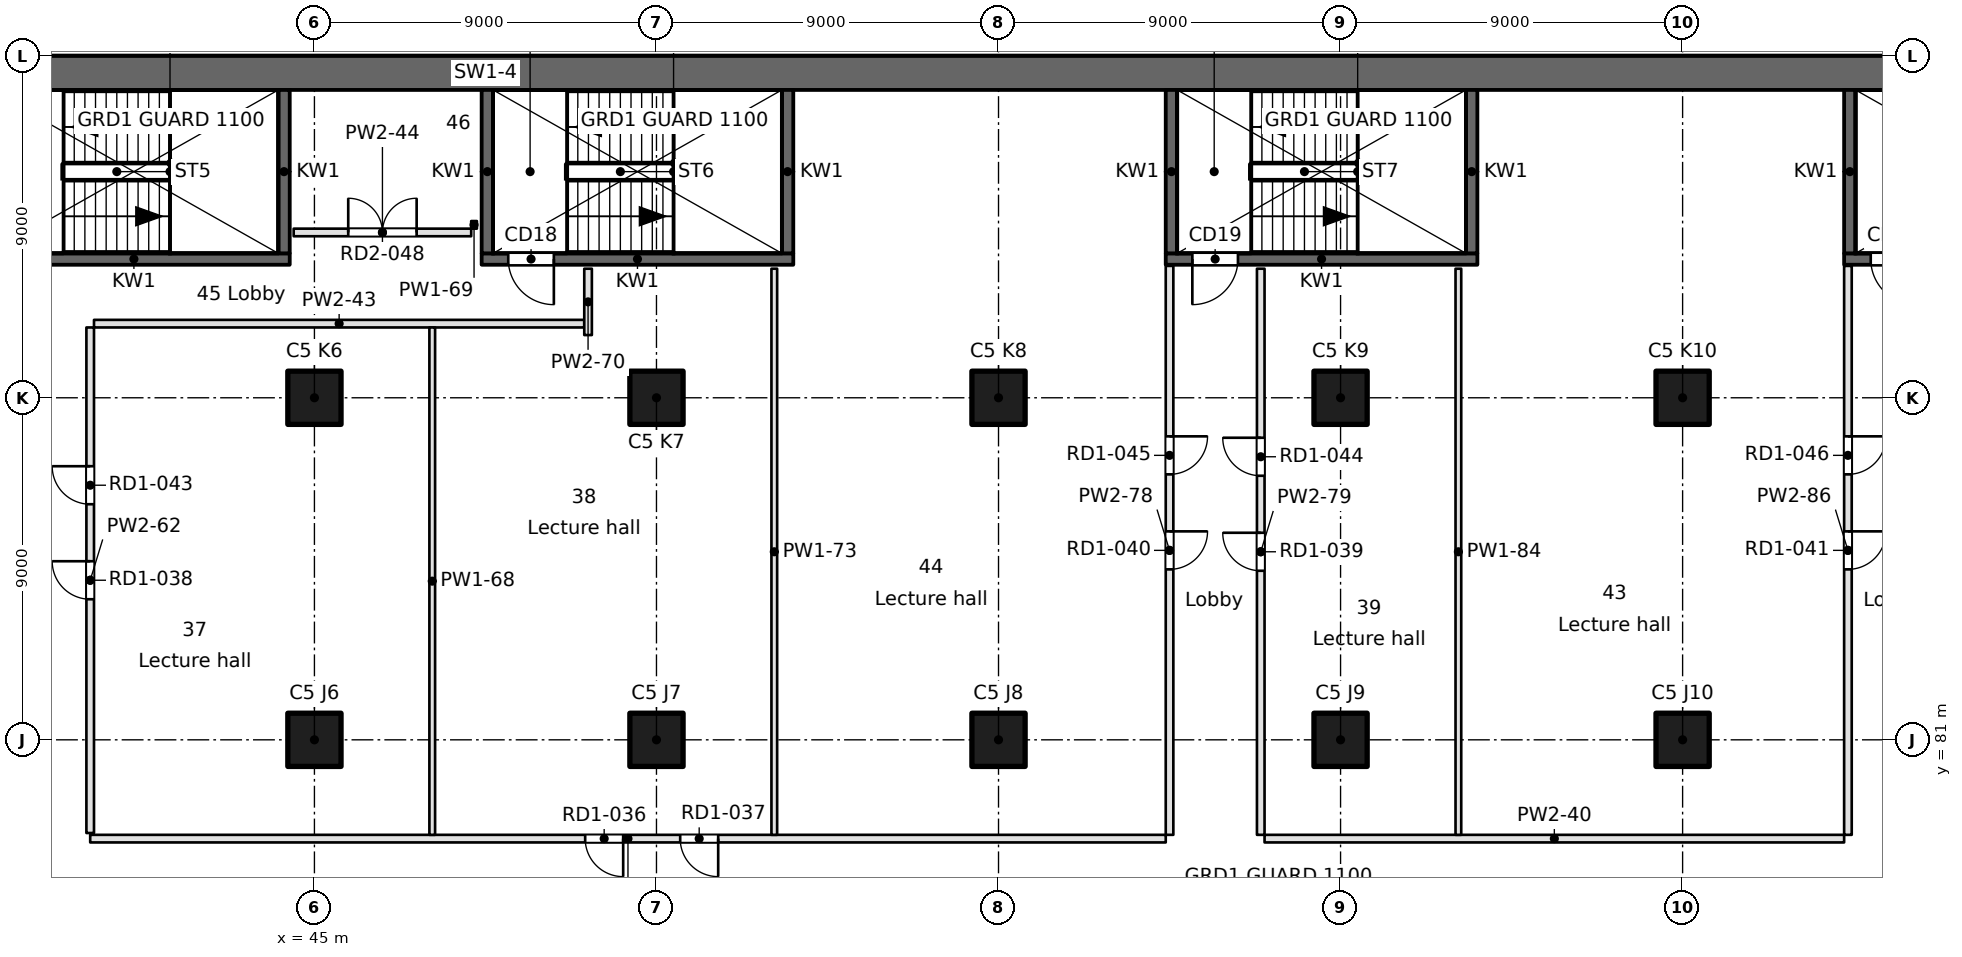
"""IFC4 building model, lengths in metres.
Left out: names, types, materials, properties, quantities, classifications, styles, units other than length and angle.
Written with IfcOpenShell. Run it as: python <this file> out.ifc"""

import sys

from ifc_helpers import new_model, si_unit, direction, frame, frame_2d, origin, origin_2d, place, context, subcontext, project, spatial, rectangle, extrude, element, fill, save


model = new_model("IFC4")
c1 = context("Model", 3, precision=1e-05, world=origin(), true_north=direction((0.0, 1.0)))
c2 = subcontext(c1, "Body", "Model", "MODEL_VIEW")
j1 = project(units=[si_unit("LENGTHUNIT", "METRE"), si_unit("PLANEANGLEUNIT", "RADIAN")], contexts=[c1])
p1 = place(None, origin())
s1 = spatial("IfcSite", under=j1, at=p1, CompositionType="ELEMENT")
p2 = place(p1, origin())
s2 = spatial("IfcBuilding", under=s1, at=p2, CompositionType="ELEMENT")
p3 = place(p2, frame((0.0, 0.0, 76.5)))
s3 = spatial("IfcBuildingStorey", under=s2, at=p3, CompositionType="ELEMENT", Elevation=76.5)
for number, where, z_axis, x_axis in (
    (1, (45.0, 81.0, 0.0), (0.0, 0.0, 1.0), (1.0, 0.0, 0.0)),
    (2, (45.0, 90.0, 0.0), (0.0, 0.0, 1.0), (1.0, 0.0, 0.0)),
    (3, (54.0, 81.0, 0.0), (0.0, 0.0, 1.0), (1.0, 0.0, 0.0)),
    (4, (54.0, 90.0, 0.0), (0.0, 0.0, 1.0), (1.0, 0.0, 0.0)),
    (5, (63.0, 81.0, 0.0), (0.0, 0.0, 1.0), (1.0, 0.0, 0.0)),
    (6, (63.0, 90.0, 0.0), (0.0, 0.0, 1.0), (1.0, 0.0, 0.0)),
    (7, (72.0, 81.0, 0.0), (0.0, 0.0, 1.0), (1.0, 0.0, 0.0)),
    (8, (72.0, 90.0, 0.0), (0.0, 0.0, 1.0), (1.0, 0.0, 0.0)),
    (9, (81.0, 81.0, 0.0), (0.0, 0.0, 1.0), (1.0, 0.0, 0.0)),
    (10, (81.0, 90.0, 0.0), (0.0, 0.0, 1.0), (1.0, 0.0, 0.0)),
):
    element("IfcColumn", number, at=place(p3, frame(where, z_axis=z_axis, x_axis=x_axis)), inside=s3, PredefinedType="COLUMN", context=c2, shape_type="SweptSolid", body=[
        extrude(rectangle(XDim=1.4, YDim=1.4, at=origin_2d()), origin(), (0.0, 0.0, 1.0), 3.7),
    ])
p4 = place(p3, frame((94.5, 98.55, 0.0), z_axis=(0.0, 0.0, 1.0), x_axis=(-1.0, 0.0, 0.0)))
e11 = element("IfcWall", 11, at=p4, inside=s3, PredefinedType="SHEAR", context=c2, shape_type="SweptSolid", body=[
    extrude(rectangle(XDim=90.0, YDim=0.9, at=frame_2d((45.0, 0.0))), origin(), (0.0, 0.0, 1.0), 3.25),
])
p5 = place(p3, frame((36.15, 93.65, -0.4), z_axis=(0.0, 0.0, 1.0), x_axis=(1.0, 0.0, 0.0)))
e12 = element("IfcWall", 12, at=p5, inside=s3, PredefinedType="SOLIDWALL", context=c2, shape_type="SweptSolid", body=[
    extrude(rectangle(XDim=8.2, YDim=0.3, at=frame_2d((4.1, 0.0))), origin(), (0.0, 0.0, 1.0), 3.65),
])
p6 = place(p5, frame((0.7, 0.0, 0.4)))
e13 = element("IfcOpeningElement", 13, at=p6, cuts=e12, PredefinedType="OPENING", context=c2, shape_type="SweptSolid", body=[
    extrude(rectangle(XDim=1.2, YDim=2.1, at=frame_2d((0.6, 1.05))), frame((0.0, 0.15, 0.0), z_axis=(0.0, -1.0, 0.0), x_axis=(1.0, 0.0, 0.0)), (0.0, 0.0, 1.0), 0.3),
])
p7 = place(p3, frame((49.4, 93.65, -0.4), z_axis=(0.0, 0.0, 1.0), x_axis=(1.0, 0.0, 0.0)))
e14 = element("IfcWall", 14, at=p7, inside=s3, PredefinedType="SOLIDWALL", context=c2, shape_type="SweptSolid", body=[
    extrude(rectangle(XDim=8.2, YDim=0.3, at=frame_2d((4.1, 0.0))), origin(), (0.0, 0.0, 1.0), 3.65),
])
p8 = place(p7, frame((0.7, 0.0, 0.4)))
e15 = element("IfcOpeningElement", 15, at=p8, cuts=e14, PredefinedType="OPENING", context=c2, shape_type="SweptSolid", body=[
    extrude(rectangle(XDim=1.2, YDim=2.1, at=frame_2d((0.6, 1.05))), frame((0.0, 0.15, 0.0), z_axis=(0.0, -1.0, 0.0), x_axis=(1.0, 0.0, 0.0)), (0.0, 0.0, 1.0), 0.3),
])
p9 = place(p3, frame((67.4, 93.65, -0.4), z_axis=(0.0, 0.0, 1.0), x_axis=(1.0, 0.0, 0.0)))
e16 = element("IfcWall", 16, at=p9, inside=s3, PredefinedType="SOLIDWALL", context=c2, shape_type="SweptSolid", body=[
    extrude(rectangle(XDim=8.2, YDim=0.3, at=frame_2d((4.1, 0.0))), origin(), (0.0, 0.0, 1.0), 3.65),
])
p10 = place(p9, frame((0.7, 0.0, 0.4)))
e17 = element("IfcOpeningElement", 17, at=p10, cuts=e16, PredefinedType="OPENING", context=c2, shape_type="SweptSolid", body=[
    extrude(rectangle(XDim=1.2, YDim=2.1, at=frame_2d((0.6, 1.05))), frame((0.0, 0.15, 0.0), z_axis=(0.0, -1.0, 0.0), x_axis=(1.0, 0.0, 0.0)), (0.0, 0.0, 1.0), 0.3),
])
p11 = place(p3, frame((85.25, 93.65, -0.4), z_axis=(0.0, 0.0, 1.0), x_axis=(1.0, 0.0, 0.0)))
e18 = element("IfcWall", 18, at=p11, inside=s3, PredefinedType="SOLIDWALL", context=c2, shape_type="SweptSolid", body=[
    extrude(rectangle(XDim=8.2, YDim=0.3, at=frame_2d((4.1, 0.0))), origin(), (0.0, 0.0, 1.0), 3.65),
])
p12 = place(p11, frame((0.7, 0.0, 0.4)))
e19 = element("IfcOpeningElement", 19, at=p12, cuts=e18, PredefinedType="OPENING", context=c2, shape_type="SweptSolid", body=[
    extrude(rectangle(XDim=1.2, YDim=2.1, at=frame_2d((0.6, 1.05))), frame((0.0, 0.15, 0.0), z_axis=(0.0, -1.0, 0.0), x_axis=(1.0, 0.0, 0.0)), (0.0, 0.0, 1.0), 0.3),
])
for number, where, z_axis, x_axis in (
    (20, (44.2, 93.8, -0.4), (0.0, 0.0, 1.0), (0.0, 1.0, 0.0)),
    (21, (49.55, 93.8, -0.4), (0.0, 0.0, 1.0), (0.0, 1.0, 0.0)),
    (22, (57.45, 93.8, -0.4), (0.0, 0.0, 1.0), (0.0, 1.0, 0.0)),
    (23, (67.55, 93.8, -0.4), (0.0, 0.0, 1.0), (0.0, 1.0, 0.0)),
    (24, (75.45, 93.8, -0.4), (0.0, 0.0, 1.0), (0.0, 1.0, 0.0)),
    (25, (85.4, 93.8, -0.4), (0.0, 0.0, 1.0), (0.0, 1.0, 0.0)),
):
    element("IfcWall", number, at=place(p3, frame(where, z_axis=z_axis, x_axis=x_axis)), inside=s3, PredefinedType="SOLIDWALL", context=c2, shape_type="SweptSolid", body=[
        extrude(rectangle(XDim=4.3, YDim=0.3, at=frame_2d((2.15, 0.0))), origin(), (0.0, 0.0, 1.0), 3.65),
    ])
p13 = place(p3, frame((39.1, 78.4, 0.0), z_axis=(0.0, 0.0, 1.0), x_axis=(1.0, 0.0, 0.0)))
e26 = element("IfcWall", 26, at=p13, inside=s3, PredefinedType="PARTITIONING", context=c2, shape_type="SweptSolid", body=[
    extrude(rectangle(XDim=28.3, YDim=0.2, at=frame_2d((14.15, 0.0))), origin(), (0.0, 0.0, 1.0), 3.25),
])
p14 = place(p13, frame((13.024, 0.0, 0.0)))
e27 = element("IfcOpeningElement", 27, at=p14, cuts=e26, PredefinedType="OPENING", context=c2, shape_type="SweptSolid", body=[
    extrude(rectangle(XDim=1.0, YDim=2.1, at=frame_2d((0.5, 1.05))), frame((0.0, 0.1, 0.0), z_axis=(0.0, -1.0, 0.0), x_axis=(1.0, 0.0, 0.0)), (0.0, 0.0, 1.0), 0.2),
])
p15 = place(p13, frame((15.524, 0.0, 0.0)))
e28 = element("IfcOpeningElement", 28, at=p15, cuts=e26, PredefinedType="OPENING", context=c2, shape_type="SweptSolid", body=[
    extrude(rectangle(XDim=1.0, YDim=2.1, at=frame_2d((0.5, 1.05))), frame((0.0, 0.1, 0.0), z_axis=(0.0, -1.0, 0.0), x_axis=(1.0, 0.0, 0.0)), (0.0, 0.0, 1.0), 0.2),
])
p16 = place(p3, frame((70.0, 78.4, 0.0), z_axis=(0.0, 0.0, 1.0), x_axis=(1.0, 0.0, 0.0)))
e29 = element("IfcWall", 29, at=p16, inside=s3, PredefinedType="PARTITIONING", context=c2, shape_type="SweptSolid", body=[
    extrude(rectangle(XDim=15.25, YDim=0.2, at=frame_2d((7.625, 0.0))), origin(), (0.0, 0.0, 1.0), 3.25),
])
p17 = place(p3, frame((52.1, 91.95, 0.0), z_axis=(0.0, 0.0, 1.0), x_axis=(-1.0, 0.0, 0.0)))
e30 = element("IfcWall", 30, at=p17, inside=s3, PredefinedType="PARTITIONING", context=c2, shape_type="SweptSolid", body=[
    extrude(rectangle(XDim=12.9, YDim=0.2, at=frame_2d((6.45, 0.0))), origin(), (0.0, 0.0, 1.0), 3.25),
])
p18 = place(p3, frame((44.454, 94.35, 0.0), z_axis=(0.0, 0.0, 1.0), x_axis=(1.0, 0.0, 0.0)))
e31 = element("IfcWall", 31, at=p18, inside=s3, PredefinedType="PARTITIONING", context=c2, shape_type="SweptSolid", body=[
    extrude(rectangle(XDim=4.671, YDim=0.2, at=frame_2d((2.335, 0.0))), origin(), (0.0, 0.0, 1.0), 3.25),
])
p19 = place(p18, frame((1.436, 0.0, 0.0)))
e32 = element("IfcOpeningElement", 32, at=p19, cuts=e31, PredefinedType="OPENING", context=c2, shape_type="SweptSolid", body=[
    extrude(rectangle(XDim=1.8, YDim=2.1, at=frame_2d((0.9, 1.05))), frame((0.0, 0.1, 0.0), z_axis=(0.0, -1.0, 0.0), x_axis=(1.0, 0.0, 0.0)), (0.0, 0.0, 1.0), 0.2),
])
p20 = place(p3, frame((39.1, 91.85, 0.0), z_axis=(0.0, 0.0, 1.0), x_axis=(0.0, -1.0, 0.0)))
e33 = element("IfcWall", 33, at=p20, inside=s3, PredefinedType="PARTITIONING", context=c2, shape_type="SweptSolid", body=[
    extrude(rectangle(XDim=13.302, YDim=0.2, at=frame_2d((6.651, 0.0))), origin(), (0.0, 0.0, 1.0), 3.25),
])
p21 = place(p20, frame((6.151, 0.0, 0.0)))
e34 = element("IfcOpeningElement", 34, at=p21, cuts=e33, PredefinedType="OPENING", context=c2, shape_type="SweptSolid", body=[
    extrude(rectangle(XDim=1.0, YDim=2.1, at=frame_2d((0.5, 1.05))), frame((0.0, 0.1, 0.0), z_axis=(0.0, -1.0, 0.0), x_axis=(1.0, 0.0, 0.0)), (0.0, 0.0, 1.0), 0.2),
])
p22 = place(p20, frame((3.651, 0.0, 0.0)))
e35 = element("IfcOpeningElement", 35, at=p22, cuts=e33, PredefinedType="OPENING", context=c2, shape_type="SweptSolid", body=[
    extrude(rectangle(XDim=1.0, YDim=2.1, at=frame_2d((0.5, 1.05))), frame((0.0, 0.1, 0.0), z_axis=(0.0, -1.0, 0.0), x_axis=(1.0, 0.0, 0.0)), (0.0, 0.0, 1.0), 0.2),
])
p23 = place(p3, frame((48.1, 91.85, 0.0), z_axis=(0.0, 0.0, 1.0), x_axis=(0.0, -1.0, 0.0)))
e36 = element("IfcWall", 36, at=p23, inside=s3, PredefinedType="PARTITIONING", context=c2, shape_type="SweptSolid", body=[
    extrude(rectangle(XDim=13.35, YDim=0.15, at=frame_2d((6.675, 0.0))), origin(), (0.0, 0.0, 1.0), 3.25),
])
p24 = place(p3, frame((49.2, 94.65, 0.0), z_axis=(0.0, 0.0, 1.0), x_axis=(0.0, -1.0, 0.0)))
e37 = element("IfcWall", 37, at=p24, inside=s3, PredefinedType="PARTITIONING", context=c2, shape_type="SweptSolid", body=[
    extrude(rectangle(XDim=0.2, YDim=0.15, at=frame_2d((0.1, 0.0))), origin(), (0.0, 0.0, 1.0), 3.25),
])
p25 = place(p3, frame((52.2, 93.396, 0.0), z_axis=(0.0, 0.0, 1.0), x_axis=(0.0, -1.0, 0.0)))
e38 = element("IfcWall", 38, at=p25, inside=s3, PredefinedType="PARTITIONING", context=c2, shape_type="SweptSolid", body=[
    extrude(rectangle(XDim=1.746, YDim=0.2, at=frame_2d((0.873, 0.0))), origin(), (0.0, 0.0, 1.0), 3.25),
])
p26 = place(p3, frame((57.1, 93.396, 0.0), z_axis=(0.0, 0.0, 1.0), x_axis=(0.0, -1.0, 0.0)))
e39 = element("IfcWall", 39, at=p26, inside=s3, PredefinedType="PARTITIONING", context=c2, shape_type="SweptSolid", body=[
    extrude(rectangle(XDim=14.896, YDim=0.15, at=frame_2d((7.448, 0.0))), origin(), (0.0, 0.0, 1.0), 3.25),
])
p27 = place(p3, frame((67.5, 78.5, 0.0), z_axis=(0.0, 0.0, 1.0), x_axis=(0.0, 1.0, 0.0)))
e40 = element("IfcWall", 40, at=p27, inside=s3, PredefinedType="PARTITIONING", context=c2, shape_type="SweptSolid", body=[
    extrude(rectangle(XDim=14.97, YDim=0.2, at=frame_2d((7.485, 0.0))), origin(), (0.0, 0.0, 1.0), 3.25),
])
p28 = place(p27, frame((6.985, 0.0, 0.0)))
e41 = element("IfcOpeningElement", 41, at=p28, cuts=e40, PredefinedType="OPENING", context=c2, shape_type="SweptSolid", body=[
    extrude(rectangle(XDim=1.0, YDim=2.1, at=frame_2d((0.5, 1.05))), frame((0.0, 0.1, 0.0), z_axis=(0.0, -1.0, 0.0), x_axis=(1.0, 0.0, 0.0)), (0.0, 0.0, 1.0), 0.2),
])
p29 = place(p27, frame((9.485, 0.0, 0.0)))
e42 = element("IfcOpeningElement", 42, at=p29, cuts=e40, PredefinedType="OPENING", context=c2, shape_type="SweptSolid", body=[
    extrude(rectangle(XDim=1.0, YDim=2.1, at=frame_2d((0.5, 1.05))), frame((0.0, 0.1, 0.0), z_axis=(0.0, -1.0, 0.0), x_axis=(1.0, 0.0, 0.0)), (0.0, 0.0, 1.0), 0.2),
])
p30 = place(p3, frame((69.9, 93.396, 0.0), z_axis=(0.0, 0.0, 1.0), x_axis=(0.0, -1.0, 0.0)))
e43 = element("IfcWall", 43, at=p30, inside=s3, PredefinedType="PARTITIONING", context=c2, shape_type="SweptSolid", body=[
    extrude(rectangle(XDim=14.896, YDim=0.2, at=frame_2d((7.448, 0.0))), origin(), (0.0, 0.0, 1.0), 3.25),
])
p31 = place(p30, frame((6.948, 0.0, 0.0)))
e44 = element("IfcOpeningElement", 44, at=p31, cuts=e43, PredefinedType="OPENING", context=c2, shape_type="SweptSolid", body=[
    extrude(rectangle(XDim=1.0, YDim=2.1, at=frame_2d((0.5, 1.05))), frame((0.0, 0.1, 0.0), z_axis=(0.0, -1.0, 0.0), x_axis=(1.0, 0.0, 0.0)), (0.0, 0.0, 1.0), 0.2),
])
p32 = place(p30, frame((4.448, 0.0, 0.0)))
e45 = element("IfcOpeningElement", 45, at=p32, cuts=e43, PredefinedType="OPENING", context=c2, shape_type="SweptSolid", body=[
    extrude(rectangle(XDim=1.0, YDim=2.1, at=frame_2d((0.5, 1.05))), frame((0.0, 0.1, 0.0), z_axis=(0.0, -1.0, 0.0), x_axis=(1.0, 0.0, 0.0)), (0.0, 0.0, 1.0), 0.2),
])
p33 = place(p3, frame((75.1, 93.396, 0.0), z_axis=(0.0, 0.0, 1.0), x_axis=(0.0, -1.0, 0.0)))
e46 = element("IfcWall", 46, at=p33, inside=s3, PredefinedType="PARTITIONING", context=c2, shape_type="SweptSolid", body=[
    extrude(rectangle(XDim=14.896, YDim=0.15, at=frame_2d((7.448, 0.0))), origin(), (0.0, 0.0, 1.0), 3.25),
])
p34 = place(p3, frame((85.35, 78.5, 0.0), z_axis=(0.0, 0.0, 1.0), x_axis=(0.0, 1.0, 0.0)))
e47 = element("IfcWall", 47, at=p34, inside=s3, PredefinedType="PARTITIONING", context=c2, shape_type="SweptSolid", body=[
    extrude(rectangle(XDim=14.97, YDim=0.2, at=frame_2d((7.485, 0.0))), origin(), (0.0, 0.0, 1.0), 3.25),
])
p35 = place(p34, frame((6.985, 0.0, 0.0)))
e48 = element("IfcOpeningElement", 48, at=p35, cuts=e47, PredefinedType="OPENING", context=c2, shape_type="SweptSolid", body=[
    extrude(rectangle(XDim=1.0, YDim=2.1, at=frame_2d((0.5, 1.05))), frame((0.0, 0.1, 0.0), z_axis=(0.0, -1.0, 0.0), x_axis=(1.0, 0.0, 0.0)), (0.0, 0.0, 1.0), 0.2),
])
p36 = place(p34, frame((9.485, 0.0, 0.0)))
e49 = element("IfcOpeningElement", 49, at=p36, cuts=e47, PredefinedType="OPENING", context=c2, shape_type="SweptSolid", body=[
    extrude(rectangle(XDim=1.0, YDim=2.1, at=frame_2d((0.5, 1.05))), frame((0.0, 0.1, 0.0), z_axis=(0.0, -1.0, 0.0), x_axis=(1.0, 0.0, 0.0)), (0.0, 0.0, 1.0), 0.2),
])
p37 = place(p8, frame((1.2, 0.0, 0.0), z_axis=(0.0, 0.0, 1.0), x_axis=(-1.0, 0.0, 0.0)))
e50 = element("IfcDoor", 50, at=p37, inside=s3, OperationType="SINGLE_SWING_LEFT", PredefinedType="DOOR", context=c2, shape_type="SweptSolid", body=[
    extrude(rectangle(XDim=1.2, YDim=2.1, at=frame_2d((0.6, 1.05))), frame((0.0, 0.025, 0.0), z_axis=(0.0, -1.0, 0.0), x_axis=(1.0, 0.0, 0.0)), (0.0, 0.0, 1.0), 0.05),
])
fill(e15, e50)
p38 = place(p10, frame((1.2, 0.0, 0.0), z_axis=(0.0, 0.0, 1.0), x_axis=(-1.0, 0.0, 0.0)))
e51 = element("IfcDoor", 51, at=p38, inside=s3, OperationType="SINGLE_SWING_RIGHT", PredefinedType="DOOR", context=c2, shape_type="SweptSolid", body=[
    extrude(rectangle(XDim=1.2, YDim=2.1, at=frame_2d((0.6, 1.05))), frame((0.0, 0.025, 0.0), z_axis=(0.0, -1.0, 0.0), x_axis=(1.0, 0.0, 0.0)), (0.0, 0.0, 1.0), 0.05),
])
fill(e17, e51)
p39 = place(p12, frame((1.2, 0.0, 0.0), z_axis=(0.0, 0.0, 1.0), x_axis=(-1.0, 0.0, 0.0)))
e52 = element("IfcDoor", 52, at=p39, inside=s3, OperationType="SINGLE_SWING_LEFT", PredefinedType="DOOR", context=c2, shape_type="SweptSolid", body=[
    extrude(rectangle(XDim=1.2, YDim=2.1, at=frame_2d((0.6, 1.05))), frame((0.0, 0.025, 0.0), z_axis=(0.0, -1.0, 0.0), x_axis=(1.0, 0.0, 0.0)), (0.0, 0.0, 1.0), 0.05),
])
fill(e19, e52)
p40 = place(p14, frame((1.0, 0.0, 0.0), z_axis=(0.0, 0.0, 1.0), x_axis=(-1.0, 0.0, 0.0)))
e53 = element("IfcDoor", 53, at=p40, inside=s3, OperationType="SINGLE_SWING_LEFT", PredefinedType="DOOR", context=c2, shape_type="SweptSolid", body=[
    extrude(rectangle(XDim=1.0, YDim=2.1, at=frame_2d((0.5, 1.05))), frame((0.0, 0.025, 0.0), z_axis=(0.0, -1.0, 0.0), x_axis=(1.0, 0.0, 0.0)), (0.0, 0.0, 1.0), 0.05),
])
fill(e27, e53)
p41 = place(p15, frame((1.0, 0.0, 0.0), z_axis=(0.0, 0.0, 1.0), x_axis=(-1.0, 0.0, 0.0)))
e54 = element("IfcDoor", 54, at=p41, inside=s3, OperationType="SINGLE_SWING_LEFT", PredefinedType="DOOR", context=c2, shape_type="SweptSolid", body=[
    extrude(rectangle(XDim=1.0, YDim=2.1, at=frame_2d((0.5, 1.05))), frame((0.0, 0.025, 0.0), z_axis=(0.0, -1.0, 0.0), x_axis=(1.0, 0.0, 0.0)), (0.0, 0.0, 1.0), 0.05),
])
fill(e28, e54)
p42 = place(p21, frame((1.0, 0.0, 0.0), z_axis=(0.0, 0.0, 1.0), x_axis=(-1.0, 0.0, 0.0)))
e55 = element("IfcDoor", 55, at=p42, inside=s3, OperationType="SINGLE_SWING_RIGHT", PredefinedType="DOOR", context=c2, shape_type="SweptSolid", body=[
    extrude(rectangle(XDim=1.0, YDim=2.1, at=frame_2d((0.5, 1.05))), frame((0.0, 0.025, 0.0), z_axis=(0.0, -1.0, 0.0), x_axis=(1.0, 0.0, 0.0)), (0.0, 0.0, 1.0), 0.05),
])
fill(e34, e55)
p43 = place(p31, frame((1.0, 0.0, 0.0), z_axis=(0.0, 0.0, 1.0), x_axis=(-1.0, 0.0, 0.0)))
e56 = element("IfcDoor", 56, at=p43, inside=s3, OperationType="SINGLE_SWING_RIGHT", PredefinedType="DOOR", context=c2, shape_type="SweptSolid", body=[
    extrude(rectangle(XDim=1.0, YDim=2.1, at=frame_2d((0.5, 1.05))), frame((0.0, 0.025, 0.0), z_axis=(0.0, -1.0, 0.0), x_axis=(1.0, 0.0, 0.0)), (0.0, 0.0, 1.0), 0.05),
])
fill(e44, e56)
p44 = place(p28, frame((1.0, 0.0, 0.0), z_axis=(0.0, 0.0, 1.0), x_axis=(-1.0, 0.0, 0.0)))
e57 = element("IfcDoor", 57, at=p44, inside=s3, OperationType="SINGLE_SWING_LEFT", PredefinedType="DOOR", context=c2, shape_type="SweptSolid", body=[
    extrude(rectangle(XDim=1.0, YDim=2.1, at=frame_2d((0.5, 1.05))), frame((0.0, 0.025, 0.0), z_axis=(0.0, -1.0, 0.0), x_axis=(1.0, 0.0, 0.0)), (0.0, 0.0, 1.0), 0.05),
])
fill(e41, e57)
p45 = place(p35, frame((1.0, 0.0, 0.0), z_axis=(0.0, 0.0, 1.0), x_axis=(-1.0, 0.0, 0.0)))
e58 = element("IfcDoor", 58, at=p45, inside=s3, OperationType="SINGLE_SWING_LEFT", PredefinedType="DOOR", context=c2, shape_type="SweptSolid", body=[
    extrude(rectangle(XDim=1.0, YDim=2.1, at=frame_2d((0.5, 1.05))), frame((0.0, 0.025, 0.0), z_axis=(0.0, -1.0, 0.0), x_axis=(1.0, 0.0, 0.0)), (0.0, 0.0, 1.0), 0.05),
])
fill(e48, e58)
p46 = place(p22, frame((1.0, 0.0, 0.0), z_axis=(0.0, 0.0, 1.0), x_axis=(-1.0, 0.0, 0.0)))
e59 = element("IfcDoor", 59, at=p46, inside=s3, OperationType="SINGLE_SWING_RIGHT", PredefinedType="DOOR", context=c2, shape_type="SweptSolid", body=[
    extrude(rectangle(XDim=1.0, YDim=2.1, at=frame_2d((0.5, 1.05))), frame((0.0, 0.025, 0.0), z_axis=(0.0, -1.0, 0.0), x_axis=(1.0, 0.0, 0.0)), (0.0, 0.0, 1.0), 0.05),
])
fill(e35, e59)
p47 = place(p32, frame((1.0, 0.0, 0.0), z_axis=(0.0, 0.0, 1.0), x_axis=(-1.0, 0.0, 0.0)))
e60 = element("IfcDoor", 60, at=p47, inside=s3, OperationType="SINGLE_SWING_RIGHT", PredefinedType="DOOR", context=c2, shape_type="SweptSolid", body=[
    extrude(rectangle(XDim=1.0, YDim=2.1, at=frame_2d((0.5, 1.05))), frame((0.0, 0.025, 0.0), z_axis=(0.0, -1.0, 0.0), x_axis=(1.0, 0.0, 0.0)), (0.0, 0.0, 1.0), 0.05),
])
fill(e45, e60)
p48 = place(p29, frame((1.0, 0.0, 0.0), z_axis=(0.0, 0.0, 1.0), x_axis=(-1.0, 0.0, 0.0)))
e61 = element("IfcDoor", 61, at=p48, inside=s3, OperationType="SINGLE_SWING_LEFT", PredefinedType="DOOR", context=c2, shape_type="SweptSolid", body=[
    extrude(rectangle(XDim=1.0, YDim=2.1, at=frame_2d((0.5, 1.05))), frame((0.0, 0.025, 0.0), z_axis=(0.0, -1.0, 0.0), x_axis=(1.0, 0.0, 0.0)), (0.0, 0.0, 1.0), 0.05),
])
fill(e42, e61)
p49 = place(p36, frame((1.0, 0.0, 0.0), z_axis=(0.0, 0.0, 1.0), x_axis=(-1.0, 0.0, 0.0)))
e62 = element("IfcDoor", 62, at=p49, inside=s3, OperationType="SINGLE_SWING_LEFT", PredefinedType="DOOR", context=c2, shape_type="SweptSolid", body=[
    extrude(rectangle(XDim=1.0, YDim=2.1, at=frame_2d((0.5, 1.05))), frame((0.0, 0.025, 0.0), z_axis=(0.0, -1.0, 0.0), x_axis=(1.0, 0.0, 0.0)), (0.0, 0.0, 1.0), 0.05),
])
fill(e49, e62)
p50 = place(p19, origin())
e63 = element("IfcDoor", 63, at=p50, inside=s3, OperationType="DOUBLE_DOOR_SINGLE_SWING", PredefinedType="DOOR", context=c2, shape_type="SweptSolid", body=[
    extrude(rectangle(XDim=1.8, YDim=2.1, at=frame_2d((0.9, 1.05))), frame((0.0, 0.025, 0.0), z_axis=(0.0, -1.0, 0.0), x_axis=(1.0, 0.0, 0.0)), (0.0, 0.0, 1.0), 0.05),
])
fill(e32, e63)
save(model, sys.argv[1])
